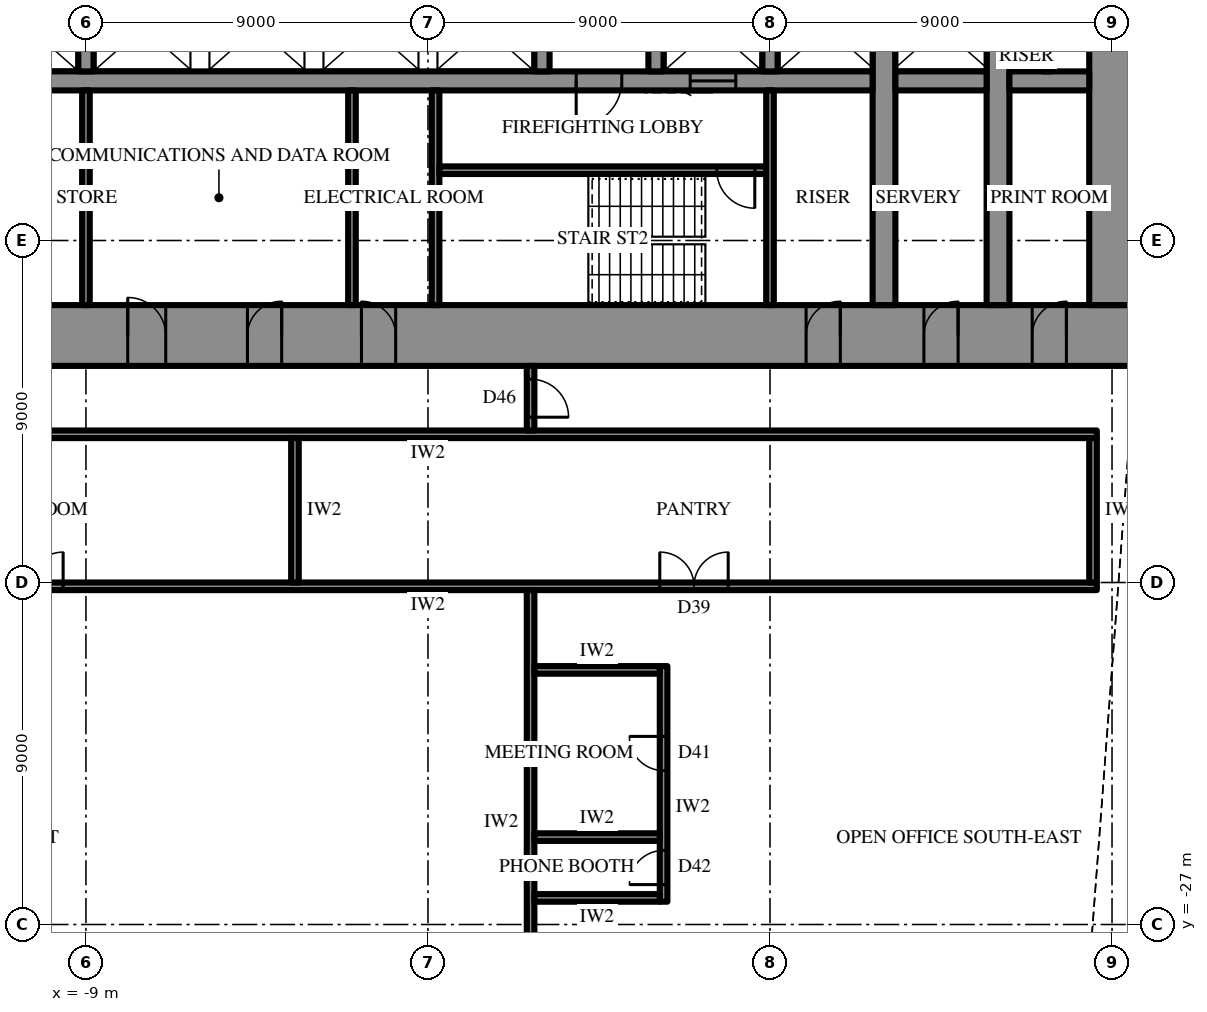
"""IFC4 building model, lengths in metres.
Left out: names, types, materials, properties, quantities, classifications, styles, units other than length and angle.
Written with IfcOpenShell. Run it as: python <this file> out.ifc"""

import sys

from ifc_helpers import new_model, si_unit, direction, frame, frame_2d, origin, place, context, subcontext, project, spatial, rectangle, extrude, element, fill, save


model = new_model("IFC4")
c1 = context("Model", 3, precision=1e-05, world=origin(), true_north=direction((0.0, 1.0)))
c2 = subcontext(c1, "Body", "Model", "MODEL_VIEW")
j1 = project(units=[si_unit("LENGTHUNIT", "METRE"), si_unit("PLANEANGLEUNIT", "RADIAN")], contexts=[c1])
p1 = place(None, origin())
s1 = spatial("IfcSite", under=j1, at=p1, CompositionType="ELEMENT")
p2 = place(p1, origin())
s2 = spatial("IfcBuilding", under=s1, at=p2, CompositionType="ELEMENT")
p3 = place(p2, frame((0.0, 0.0, 157.3)))
s3 = spatial("IfcBuildingStorey", under=s2, at=p3, CompositionType="ELEMENT", Elevation=157.3)
p4 = place(p3, frame((18.6, -11.5, 0.0), z_axis=(0.0, 0.0, 1.0), x_axis=(-1.0, 0.0, 0.0)))
e1 = element("IfcWall", 1, at=p4, inside=s3, PredefinedType="SHEAR", context=c2, shape_type="SweptSolid", body=[
    extrude(rectangle(XDim=37.2, YDim=1.6, at=frame_2d((18.6, 0.0))), origin(), (0.0, 0.0, 1.0), 4.2),
])
p5 = place(p4, frame((19.45, 0.0, 0.0)))
e2 = element("IfcOpeningElement", 2, at=p5, cuts=e1, PredefinedType="OPENING", context=c2, shape_type="SweptSolid", body=[
    extrude(rectangle(XDim=0.9, YDim=2.2, at=frame_2d((0.45, 1.1))), frame((0.0, 0.81, 0.0), z_axis=(0.0, -1.0, 0.0), x_axis=(1.0, 0.0, 0.0)), (0.0, 0.0, 1.0), 1.62),
])
p6 = place(p4, frame((22.45, 0.0, 0.0)))
e3 = element("IfcOpeningElement", 3, at=p6, cuts=e1, PredefinedType="OPENING", context=c2, shape_type="SweptSolid", body=[
    extrude(rectangle(XDim=0.9, YDim=2.2, at=frame_2d((0.45, 1.1))), frame((0.0, 0.81, 0.0), z_axis=(0.0, -1.0, 0.0), x_axis=(1.0, 0.0, 0.0)), (0.0, 0.0, 1.0), 1.62),
])
p7 = place(p4, frame((25.5, 0.0, 0.0)))
e4 = element("IfcOpeningElement", 4, at=p7, cuts=e1, PredefinedType="OPENING", context=c2, shape_type="SweptSolid", body=[
    extrude(rectangle(XDim=1.0, YDim=2.2, at=frame_2d((0.5, 1.1))), frame((0.0, 0.81, 0.0), z_axis=(0.0, -1.0, 0.0), x_axis=(1.0, 0.0, 0.0)), (0.0, 0.0, 1.0), 1.62),
])
p8 = place(p4, frame((1.8, 0.0, 0.0)))
e5 = element("IfcOpeningElement", 5, at=p8, cuts=e1, PredefinedType="OPENING", context=c2, shape_type="SweptSolid", body=[
    extrude(rectangle(XDim=0.9, YDim=2.2, at=frame_2d((0.45, 1.1))), frame((0.0, 0.81, 0.0), z_axis=(0.0, -1.0, 0.0), x_axis=(1.0, 0.0, 0.0)), (0.0, 0.0, 1.0), 1.62),
])
p9 = place(p4, frame((4.65, 0.0, 0.0)))
e6 = element("IfcOpeningElement", 6, at=p9, cuts=e1, PredefinedType="OPENING", context=c2, shape_type="SweptSolid", body=[
    extrude(rectangle(XDim=0.9, YDim=2.2, at=frame_2d((0.45, 1.1))), frame((0.0, 0.81, 0.0), z_axis=(0.0, -1.0, 0.0), x_axis=(1.0, 0.0, 0.0)), (0.0, 0.0, 1.0), 1.62),
])
p10 = place(p4, frame((7.75, 0.0, 0.0)))
e7 = element("IfcOpeningElement", 7, at=p10, cuts=e1, PredefinedType="OPENING", context=c2, shape_type="SweptSolid", body=[
    extrude(rectangle(XDim=0.9, YDim=2.2, at=frame_2d((0.45, 1.1))), frame((0.0, 0.81, 0.0), z_axis=(0.0, -1.0, 0.0), x_axis=(1.0, 0.0, 0.0)), (0.0, 0.0, 1.0), 1.62),
])
p11 = place(p4, frame((28.55, 0.0, 0.0)))
e8 = element("IfcOpeningElement", 8, at=p11, cuts=e1, PredefinedType="OPENING", context=c2, shape_type="SweptSolid", body=[
    extrude(rectangle(XDim=0.9, YDim=2.2, at=frame_2d((0.45, 1.1))), frame((0.0, 0.81, 0.0), z_axis=(0.0, -1.0, 0.0), x_axis=(1.0, 0.0, 0.0)), (0.0, 0.0, 1.0), 1.62),
])
p12 = place(p4, frame((31.65, 0.0, 0.0)))
e9 = element("IfcOpeningElement", 9, at=p12, cuts=e1, PredefinedType="OPENING", context=c2, shape_type="SweptSolid", body=[
    extrude(rectangle(XDim=0.9, YDim=2.2, at=frame_2d((0.45, 1.1))), frame((0.0, 0.81, 0.0), z_axis=(0.0, -1.0, 0.0), x_axis=(1.0, 0.0, 0.0)), (0.0, 0.0, 1.0), 1.62),
])
p13 = place(p4, frame((34.5, 0.0, 0.0)))
e10 = element("IfcOpeningElement", 10, at=p13, cuts=e1, PredefinedType="OPENING", context=c2, shape_type="SweptSolid", body=[
    extrude(rectangle(XDim=0.9, YDim=2.2, at=frame_2d((0.45, 1.1))), frame((0.0, 0.81, 0.0), z_axis=(0.0, -1.0, 0.0), x_axis=(1.0, 0.0, 0.0)), (0.0, 0.0, 1.0), 1.62),
])
p14 = place(p3, frame((18.0, -10.7, 0.0), z_axis=(0.0, 0.0, 1.0), x_axis=(0.0, 1.0, 0.0)))
e11 = element("IfcWall", 11, at=p14, inside=s3, PredefinedType="SHEAR", context=c2, shape_type="SweptSolid", body=[
    extrude(rectangle(XDim=21.4, YDim=1.2, at=frame_2d((10.7, 0.0))), origin(), (0.0, 0.0, 1.0), 4.2),
])
p15 = place(p14, frame((9.8, 0.0, 0.0)))
e12 = element("IfcOpeningElement", 12, at=p15, cuts=e11, PredefinedType="OPENING", context=c2, shape_type="SweptSolid", body=[
    extrude(rectangle(XDim=1.8, YDim=2.4, at=frame_2d((0.9, 1.2))), frame((0.0, 0.61, 0.0), z_axis=(0.0, -1.0, 0.0), x_axis=(1.0, 0.0, 0.0)), (0.0, 0.0, 1.0), 1.22),
])
p16 = place(p3, frame((12.0, -10.7, 0.0), z_axis=(0.0, 0.0, 1.0), x_axis=(0.0, 1.0, 0.0)))
e13 = element("IfcWall", 13, at=p16, inside=s3, PredefinedType="SHEAR", context=c2, shape_type="SweptSolid", body=[
    extrude(rectangle(XDim=21.4, YDim=0.6, at=frame_2d((10.7, 0.0))), origin(), (0.0, 0.0, 1.0), 4.2),
])
p17 = place(p16, frame((9.8, 0.0, 0.0)))
e14 = element("IfcOpeningElement", 14, at=p17, cuts=e13, PredefinedType="OPENING", context=c2, shape_type="SweptSolid", body=[
    extrude(rectangle(XDim=1.8, YDim=2.4, at=frame_2d((0.9, 1.2))), frame((0.0, 0.31, 0.0), z_axis=(0.0, -1.0, 0.0), x_axis=(1.0, 0.0, 0.0)), (0.0, 0.0, 1.0), 0.62),
])
p18 = place(p3, frame((15.0, -10.7, 0.0), z_axis=(0.0, 0.0, 1.0), x_axis=(0.0, 1.0, 0.0)))
e15 = element("IfcWall", 15, at=p18, inside=s3, PredefinedType="SHEAR", context=c2, shape_type="SweptSolid", body=[
    extrude(rectangle(XDim=21.4, YDim=0.6, at=frame_2d((10.7, 0.0))), origin(), (0.0, 0.0, 1.0), 4.2),
])
p19 = place(p18, frame((9.8, 0.0, 0.0)))
e16 = element("IfcOpeningElement", 16, at=p19, cuts=e15, PredefinedType="OPENING", context=c2, shape_type="SweptSolid", body=[
    extrude(rectangle(XDim=1.8, YDim=2.4, at=frame_2d((0.9, 1.2))), frame((0.0, 0.31, 0.0), z_axis=(0.0, -1.0, 0.0), x_axis=(1.0, 0.0, 0.0)), (0.0, 0.0, 1.0), 0.62),
])
p20 = place(p3, frame((17.4, -4.8, 0.0), z_axis=(0.0, 0.0, 1.0), x_axis=(-1.0, 0.0, 0.0)))
e17 = element("IfcWall", 17, at=p20, inside=s3, PredefinedType="SHEAR", context=c2, shape_type="SweptSolid", body=[
    extrude(rectangle(XDim=2.1, YDim=0.5, at=frame_2d((1.05, 0.0))), origin(), (0.0, 0.0, 1.0), 4.2),
])
p21 = place(p3, frame((14.7, -4.8, 0.0), z_axis=(0.0, 0.0, 1.0), x_axis=(-1.0, 0.0, 0.0)))
e18 = element("IfcWall", 18, at=p21, inside=s3, PredefinedType="SHEAR", context=c2, shape_type="SweptSolid", body=[
    extrude(rectangle(XDim=2.4, YDim=0.5, at=frame_2d((1.2, 0.0))), origin(), (0.0, 0.0, 1.0), 4.2),
])
p22 = place(p3, frame((11.7, -4.8, 0.0), z_axis=(0.0, 0.0, 1.0), x_axis=(-1.0, 0.0, 0.0)))
e19 = element("IfcWall", 19, at=p22, inside=s3, PredefinedType="SHEAR", context=c2, shape_type="SweptSolid", body=[
    extrude(rectangle(XDim=23.4, YDim=0.5, at=frame_2d((11.7, 0.0))), origin(), (0.0, 0.0, 1.0), 4.2),
])
p23 = place(p22, frame((6.6, 0.0, 0.0)))
e20 = element("IfcOpeningElement", 20, at=p23, cuts=e19, PredefinedType="OPENING", context=c2, shape_type="SweptSolid", body=[
    extrude(rectangle(XDim=1.2, YDim=2.2, at=frame_2d((0.6, 1.1))), frame((0.0, 0.26, 0.0), z_axis=(0.0, -1.0, 0.0), x_axis=(1.0, 0.0, 0.0)), (0.0, 0.0, 1.0), 0.52),
])
p24 = place(p22, frame((3.6, 0.0, 0.0)))
e21 = element("IfcOpeningElement", 21, at=p24, cuts=e19, PredefinedType="OPENING", context=c2, shape_type="SweptSolid", body=[
    extrude(rectangle(XDim=1.2, YDim=2.2, at=frame_2d((0.6, 1.1))), frame((0.0, 0.26, 0.0), z_axis=(0.0, -1.0, 0.0), x_axis=(1.0, 0.0, 0.0)), (0.0, 0.0, 1.0), 0.52),
])
for number, where, z_axis, x_axis in (
    (22, (9.0, -2.25, 0.0), (0.0, 0.0, 1.0), (0.0, -1.0, 0.0)),
    (23, (6.0, -2.25, 0.0), (0.0, 0.0, 1.0), (0.0, -1.0, 0.0)),
    (24, (3.0, -2.25, 0.0), (0.0, 0.0, 1.0), (0.0, -1.0, 0.0)),
    (25, (-9.0, -2.25, 0.0), (0.0, 0.0, 1.0), (0.0, -1.0, 0.0)),
):
    element("IfcWall", number, at=place(p3, frame(where, z_axis=z_axis, x_axis=x_axis)), inside=s3, PredefinedType="SHEAR", context=c2, shape_type="SweptSolid", body=[
        extrude(rectangle(XDim=2.3, YDim=0.4, at=frame_2d((1.15, 0.0))), origin(), (0.0, 0.0, 1.0), 4.2),
    ])
p25 = place(p3, frame((0.2, -5.05, 0.0), z_axis=(0.0, 0.0, 1.0), x_axis=(0.0, -1.0, 0.0)))
e26 = element("IfcWall", 26, at=p25, inside=s3, PredefinedType="SHEAR", context=c2, shape_type="SweptSolid", body=[
    extrude(rectangle(XDim=5.65, YDim=0.2, at=frame_2d((2.825, 0.0))), origin(), (0.0, 0.0, 1.0), 4.2),
])
p26 = place(p3, frame((8.9, -7.15, 0.0), z_axis=(0.0, 0.0, 1.0), x_axis=(-1.0, 0.0, 0.0)))
e27 = element("IfcWall", 27, at=p26, inside=s3, PredefinedType="SHEAR", context=c2, shape_type="SweptSolid", body=[
    extrude(rectangle(XDim=8.6, YDim=0.2, at=frame_2d((4.3, 0.0))), origin(), (0.0, 0.0, 1.0), 4.2),
])
p27 = place(p26, frame((0.3, 0.0, 0.0)))
e28 = element("IfcOpeningElement", 28, at=p27, cuts=e27, PredefinedType="OPENING", context=c2, shape_type="SweptSolid", body=[
    extrude(rectangle(XDim=1.0, YDim=2.2, at=frame_2d((0.5, 1.1))), frame((0.0, 0.11, 0.0), z_axis=(0.0, -1.0, 0.0), x_axis=(1.0, 0.0, 0.0)), (0.0, 0.0, 1.0), 0.22),
])
for number, where, z_axis, x_axis in (
    (29, (9.0, -5.05, 0.0), (0.0, 0.0, 1.0), (0.0, -1.0, 0.0)),
    (30, (-9.0, -5.05, 0.0), (0.0, 0.0, 1.0), (0.0, -1.0, 0.0)),
    (31, (-2.0, -5.05, 0.0), (0.0, 0.0, 1.0), (0.0, -1.0, 0.0)),
):
    element("IfcWall", number, at=place(p3, frame(where, z_axis=z_axis, x_axis=x_axis)), inside=s3, PredefinedType="PARTITIONING", context=c2, shape_type="SweptSolid", body=[
        extrude(rectangle(XDim=5.65, YDim=0.2, at=frame_2d((2.825, 0.0))), origin(), (0.0, 0.0, 1.0), 4.0),
    ])
p28 = place(p3, frame((16.3, -3.55, 0.0), z_axis=(0.0, 0.0, 1.0), x_axis=(0.0, -1.0, 0.0)))
e32 = element("IfcWall", 32, at=p28, inside=s3, PredefinedType="PARTITIONING", context=c2, shape_type="SweptSolid", body=[
    extrude(rectangle(XDim=1.0, YDim=0.2, at=frame_2d((0.5, 0.0))), origin(), (0.0, 0.0, 1.0), 4.0),
])
p29 = place(p3, frame((17.6, -14.1, 0.0), z_axis=(0.0, 0.0, 1.0), x_axis=(-1.0, 0.0, 0.0)))
e33 = element("IfcWall", 33, at=p29, inside=s3, PredefinedType="PARTITIONING", context=c2, shape_type="SweptSolid", body=[
    extrude(rectangle(XDim=35.2, YDim=0.2, at=frame_2d((17.6, 0.0))), origin(), (0.0, 0.0, 1.0), 4.0),
])
p30 = place(p3, frame((17.6, -18.1, 0.0), z_axis=(0.0, 0.0, 1.0), x_axis=(-1.0, 0.0, 0.0)))
e34 = element("IfcWall", 34, at=p30, inside=s3, PredefinedType="PARTITIONING", context=c2, shape_type="SweptSolid", body=[
    extrude(rectangle(XDim=35.2, YDim=0.2, at=frame_2d((17.6, 0.0))), origin(), (0.0, 0.0, 1.0), 4.0),
])
p31 = place(p30, frame((9.7, 0.0, 0.0)))
e35 = element("IfcOpeningElement", 35, at=p31, cuts=e34, PredefinedType="OPENING", context=c2, shape_type="SweptSolid", body=[
    extrude(rectangle(XDim=1.8, YDim=2.4, at=frame_2d((0.9, 1.2))), frame((0.0, 0.11, 0.0), z_axis=(0.0, -1.0, 0.0), x_axis=(1.0, 0.0, 0.0)), (0.0, 0.0, 1.0), 0.22),
])
p32 = place(p30, frame((27.2, 0.0, 0.0)))
e36 = element("IfcOpeningElement", 36, at=p32, cuts=e34, PredefinedType="OPENING", context=c2, shape_type="SweptSolid", body=[
    extrude(rectangle(XDim=1.8, YDim=2.4, at=frame_2d((0.9, 1.2))), frame((0.0, 0.11, 0.0), z_axis=(0.0, -1.0, 0.0), x_axis=(1.0, 0.0, 0.0)), (0.0, 0.0, 1.0), 0.22),
])
for number, where, z_axis, x_axis in (
    (37, (17.5, -14.2, 0.0), (0.0, 0.0, 1.0), (0.0, -1.0, 0.0)),
    (38, (-3.5, -14.2, 0.0), (0.0, 0.0, 1.0), (0.0, -1.0, 0.0)),
):
    element("IfcWall", number, at=place(p3, frame(where, z_axis=z_axis, x_axis=x_axis)), inside=s3, PredefinedType="PARTITIONING", context=c2, shape_type="SweptSolid", body=[
        extrude(rectangle(XDim=3.8, YDim=0.2, at=frame_2d((1.9, 0.0))), origin(), (0.0, 0.0, 1.0), 4.0),
    ])
p33 = place(p3, frame((2.7, -12.3, 0.0), z_axis=(0.0, 0.0, 1.0), x_axis=(0.0, -1.0, 0.0)))
e39 = element("IfcWall", 39, at=p33, inside=s3, PredefinedType="PARTITIONING", context=c2, shape_type="SweptSolid", body=[
    extrude(rectangle(XDim=1.7, YDim=0.2, at=frame_2d((0.85, 0.0))), origin(), (0.0, 0.0, 1.0), 4.0),
])
p34 = place(p33, frame((0.35, 0.0, 0.0)))
e40 = element("IfcOpeningElement", 40, at=p34, cuts=e39, PredefinedType="OPENING", context=c2, shape_type="SweptSolid", body=[
    extrude(rectangle(XDim=1.0, YDim=2.2, at=frame_2d((0.5, 1.1))), frame((0.0, 0.11, 0.0), z_axis=(0.0, -1.0, 0.0), x_axis=(1.0, 0.0, 0.0)), (0.0, 0.0, 1.0), 0.22),
])
p35 = place(p3, frame((2.7, -18.2, 0.0), z_axis=(0.0, 0.0, 1.0), x_axis=(0.0, -1.0, 0.0)))
e41 = element("IfcWall", 41, at=p35, inside=s3, PredefinedType="PARTITIONING", context=c2, shape_type="SweptSolid", body=[
    extrude(rectangle(XDim=10.2, YDim=0.2, at=frame_2d((5.1, 0.0))), origin(), (0.0, 0.0, 1.0), 4.0),
])
p36 = place(p3, frame((6.2, -20.2, 0.0), z_axis=(0.0, 0.0, 1.0), x_axis=(0.0, -1.0, 0.0)))
e42 = element("IfcWall", 42, at=p36, inside=s3, PredefinedType="PARTITIONING", context=c2, shape_type="SweptSolid", body=[
    extrude(rectangle(XDim=6.2, YDim=0.2, at=frame_2d((3.1, 0.0))), origin(), (0.0, 0.0, 1.0), 4.0),
])
p37 = place(p36, frame((1.85, 0.0, 0.0)))
e43 = element("IfcOpeningElement", 43, at=p37, cuts=e42, PredefinedType="OPENING", context=c2, shape_type="SweptSolid", body=[
    extrude(rectangle(XDim=0.9, YDim=2.2, at=frame_2d((0.45, 1.1))), frame((0.0, 0.11, 0.0), z_axis=(0.0, -1.0, 0.0), x_axis=(1.0, 0.0, 0.0)), (0.0, 0.0, 1.0), 0.22),
])
p38 = place(p36, frame((4.85, 0.0, 0.0)))
e44 = element("IfcOpeningElement", 44, at=p38, cuts=e42, PredefinedType="OPENING", context=c2, shape_type="SweptSolid", body=[
    extrude(rectangle(XDim=0.9, YDim=2.2, at=frame_2d((0.45, 1.1))), frame((0.0, 0.11, 0.0), z_axis=(0.0, -1.0, 0.0), x_axis=(1.0, 0.0, 0.0)), (0.0, 0.0, 1.0), 0.22),
])
for number, where, z_axis, x_axis in (
    (45, (2.8, -20.3, 0.0), (0.0, 0.0, 1.0), (1.0, 0.0, 0.0)),
    (46, (2.8, -24.7, 0.0), (0.0, 0.0, 1.0), (1.0, 0.0, 0.0)),
    (47, (2.8, -26.3, 0.0), (0.0, 0.0, 1.0), (1.0, 0.0, 0.0)),
):
    element("IfcWall", number, at=place(p3, frame(where, z_axis=z_axis, x_axis=x_axis)), inside=s3, PredefinedType="PARTITIONING", context=c2, shape_type="SweptSolid", body=[
        extrude(rectangle(XDim=3.3, YDim=0.2, at=frame_2d((1.65, 0.0))), origin(), (0.0, 0.0, 1.0), 4.0),
    ])
p39 = place(p23, origin())
e48 = element("IfcDoor", 48, at=p39, inside=s3, OperationType="SINGLE_SWING_LEFT", PredefinedType="DOOR", context=c2, shape_type="SweptSolid", body=[
    extrude(rectangle(XDim=1.2, YDim=2.2, at=frame_2d((0.6, 1.1))), frame((0.0, 0.025, 0.0), z_axis=(0.0, -1.0, 0.0), x_axis=(1.0, 0.0, 0.0)), (0.0, 0.0, 1.0), 0.05),
])
fill(e20, e48)
p40 = place(p27, origin())
e49 = element("IfcDoor", 49, at=p40, inside=s3, OperationType="SINGLE_SWING_RIGHT", PredefinedType="DOOR", context=c2, shape_type="SweptSolid", body=[
    extrude(rectangle(XDim=1.0, YDim=2.2, at=frame_2d((0.5, 1.1))), frame((0.0, 0.025, 0.0), z_axis=(0.0, -1.0, 0.0), x_axis=(1.0, 0.0, 0.0)), (0.0, 0.0, 1.0), 0.05),
])
fill(e28, e49)
p41 = place(p5, frame((0.9, 0.0, 0.0), z_axis=(0.0, 0.0, 1.0), x_axis=(-1.0, 0.0, 0.0)))
e50 = element("IfcDoor", 50, at=p41, inside=s3, OperationType="SINGLE_SWING_RIGHT", PredefinedType="DOOR", context=c2, shape_type="SweptSolid", body=[
    extrude(rectangle(XDim=0.9, YDim=2.2, at=frame_2d((0.45, 1.1))), frame((0.0, 0.025, 0.0), z_axis=(0.0, -1.0, 0.0), x_axis=(1.0, 0.0, 0.0)), (0.0, 0.0, 1.0), 0.05),
])
fill(e2, e50)
p42 = place(p6, frame((0.9, 0.0, 0.0), z_axis=(0.0, 0.0, 1.0), x_axis=(-1.0, 0.0, 0.0)))
e51 = element("IfcDoor", 51, at=p42, inside=s3, OperationType="SINGLE_SWING_LEFT", PredefinedType="DOOR", context=c2, shape_type="SweptSolid", body=[
    extrude(rectangle(XDim=0.9, YDim=2.2, at=frame_2d((0.45, 1.1))), frame((0.0, 0.025, 0.0), z_axis=(0.0, -1.0, 0.0), x_axis=(1.0, 0.0, 0.0)), (0.0, 0.0, 1.0), 0.05),
])
fill(e3, e51)
p43 = place(p7, frame((1.0, 0.0, 0.0), z_axis=(0.0, 0.0, 1.0), x_axis=(-1.0, 0.0, 0.0)))
e52 = element("IfcDoor", 52, at=p43, inside=s3, OperationType="SINGLE_SWING_RIGHT", PredefinedType="DOOR", context=c2, shape_type="SweptSolid", body=[
    extrude(rectangle(XDim=1.0, YDim=2.2, at=frame_2d((0.5, 1.1))), frame((0.0, 0.025, 0.0), z_axis=(0.0, -1.0, 0.0), x_axis=(1.0, 0.0, 0.0)), (0.0, 0.0, 1.0), 0.05),
])
fill(e4, e52)
p44 = place(p8, frame((0.9, 0.0, 0.0), z_axis=(0.0, 0.0, 1.0), x_axis=(-1.0, 0.0, 0.0)))
e53 = element("IfcDoor", 53, at=p44, inside=s3, OperationType="SINGLE_SWING_LEFT", PredefinedType="DOOR", context=c2, shape_type="SweptSolid", body=[
    extrude(rectangle(XDim=0.9, YDim=2.2, at=frame_2d((0.45, 1.1))), frame((0.0, 0.025, 0.0), z_axis=(0.0, -1.0, 0.0), x_axis=(1.0, 0.0, 0.0)), (0.0, 0.0, 1.0), 0.05),
])
fill(e5, e53)
p45 = place(p9, frame((0.9, 0.0, 0.0), z_axis=(0.0, 0.0, 1.0), x_axis=(-1.0, 0.0, 0.0)))
e54 = element("IfcDoor", 54, at=p45, inside=s3, OperationType="SINGLE_SWING_LEFT", PredefinedType="DOOR", context=c2, shape_type="SweptSolid", body=[
    extrude(rectangle(XDim=0.9, YDim=2.2, at=frame_2d((0.45, 1.1))), frame((0.0, 0.025, 0.0), z_axis=(0.0, -1.0, 0.0), x_axis=(1.0, 0.0, 0.0)), (0.0, 0.0, 1.0), 0.05),
])
fill(e6, e54)
p46 = place(p10, frame((0.9, 0.0, 0.0), z_axis=(0.0, 0.0, 1.0), x_axis=(-1.0, 0.0, 0.0)))
e55 = element("IfcDoor", 55, at=p46, inside=s3, OperationType="SINGLE_SWING_LEFT", PredefinedType="DOOR", context=c2, shape_type="SweptSolid", body=[
    extrude(rectangle(XDim=0.9, YDim=2.2, at=frame_2d((0.45, 1.1))), frame((0.0, 0.025, 0.0), z_axis=(0.0, -1.0, 0.0), x_axis=(1.0, 0.0, 0.0)), (0.0, 0.0, 1.0), 0.05),
])
fill(e7, e55)
p47 = place(p24, origin())
e56 = element("IfcDoor", 56, at=p47, inside=s3, OperationType="SLIDING_TO_LEFT", PredefinedType="DOOR", context=c2, shape_type="SweptSolid", body=[
    extrude(rectangle(XDim=1.2, YDim=2.2, at=frame_2d((0.6, 1.1))), frame((0.0, 0.025, 0.0), z_axis=(0.0, -1.0, 0.0), x_axis=(1.0, 0.0, 0.0)), (0.0, 0.0, 1.0), 0.05),
])
fill(e21, e56)
p48 = place(p31, frame((1.8, 0.0, 0.0), z_axis=(0.0, 0.0, 1.0), x_axis=(-1.0, 0.0, 0.0)))
e57 = element("IfcDoor", 57, at=p48, inside=s3, OperationType="DOUBLE_DOOR_SINGLE_SWING", PredefinedType="DOOR", context=c2, shape_type="SweptSolid", body=[
    extrude(rectangle(XDim=1.8, YDim=2.4, at=frame_2d((0.9, 1.2))), frame((0.0, 0.025, 0.0), z_axis=(0.0, -1.0, 0.0), x_axis=(1.0, 0.0, 0.0)), (0.0, 0.0, 1.0), 0.05),
])
fill(e35, e57)
p49 = place(p32, frame((1.8, 0.0, 0.0), z_axis=(0.0, 0.0, 1.0), x_axis=(-1.0, 0.0, 0.0)))
e58 = element("IfcDoor", 58, at=p49, inside=s3, OperationType="DOUBLE_DOOR_SINGLE_SWING", PredefinedType="DOOR", context=c2, shape_type="SweptSolid", body=[
    extrude(rectangle(XDim=1.8, YDim=2.4, at=frame_2d((0.9, 1.2))), frame((0.0, 0.025, 0.0), z_axis=(0.0, -1.0, 0.0), x_axis=(1.0, 0.0, 0.0)), (0.0, 0.0, 1.0), 0.05),
])
fill(e36, e58)
p50 = place(p34, origin())
e59 = element("IfcDoor", 59, at=p50, inside=s3, OperationType="SINGLE_SWING_LEFT", PredefinedType="DOOR", context=c2, shape_type="SweptSolid", body=[
    extrude(rectangle(XDim=1.0, YDim=2.2, at=frame_2d((0.5, 1.1))), frame((0.0, 0.025, 0.0), z_axis=(0.0, -1.0, 0.0), x_axis=(1.0, 0.0, 0.0)), (0.0, 0.0, 1.0), 0.05),
])
fill(e40, e59)
p51 = place(p37, frame((0.9, 0.0, 0.0), z_axis=(0.0, 0.0, 1.0), x_axis=(-1.0, 0.0, 0.0)))
e60 = element("IfcDoor", 60, at=p51, inside=s3, OperationType="SINGLE_SWING_LEFT", PredefinedType="DOOR", context=c2, shape_type="SweptSolid", body=[
    extrude(rectangle(XDim=0.9, YDim=2.2, at=frame_2d((0.45, 1.1))), frame((0.0, 0.025, 0.0), z_axis=(0.0, -1.0, 0.0), x_axis=(1.0, 0.0, 0.0)), (0.0, 0.0, 1.0), 0.05),
])
fill(e43, e60)
p52 = place(p38, frame((0.9, 0.0, 0.0), z_axis=(0.0, 0.0, 1.0), x_axis=(-1.0, 0.0, 0.0)))
e61 = element("IfcDoor", 61, at=p52, inside=s3, OperationType="SINGLE_SWING_RIGHT", PredefinedType="DOOR", context=c2, shape_type="SweptSolid", body=[
    extrude(rectangle(XDim=0.9, YDim=2.2, at=frame_2d((0.45, 1.1))), frame((0.0, 0.025, 0.0), z_axis=(0.0, -1.0, 0.0), x_axis=(1.0, 0.0, 0.0)), (0.0, 0.0, 1.0), 0.05),
])
fill(e44, e61)
save(model, sys.argv[1])
